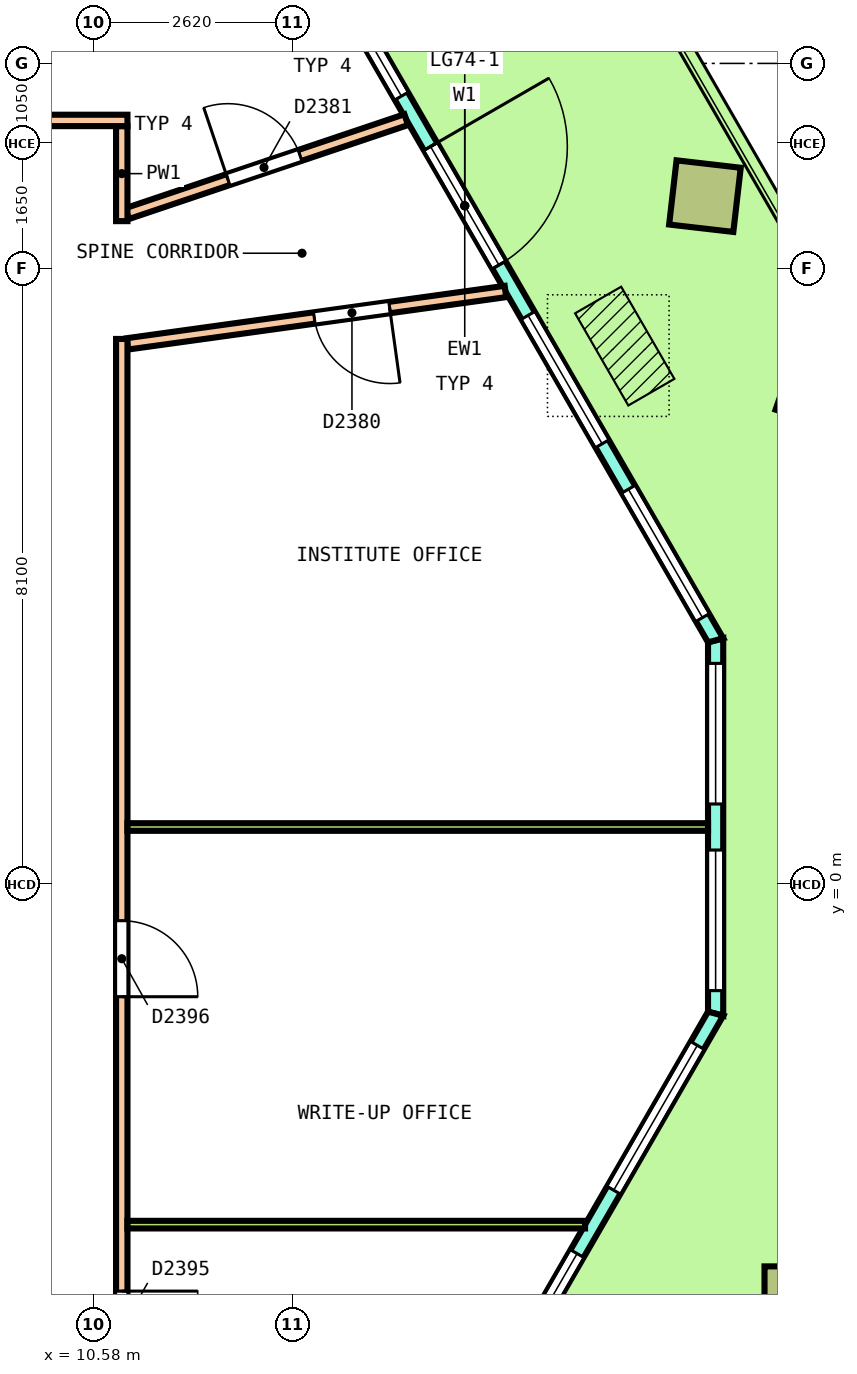
"""IFC4 building model, lengths in metres.
Left out: names, types, materials, properties, quantities, classifications, styles, units other than length and angle.
Written with IfcOpenShell. Run it as: python <this file> out.ifc"""

import sys

from ifc_helpers import new_model, si_unit, direction, frame, frame_2d, origin, origin_2d, place, context, subcontext, project, spatial, polyline, rectangle, outline, extrude, element, fill, save


model = new_model("IFC4")
c1 = context("Model", 3, precision=1e-05, world=origin(), true_north=direction((0.0, 1.0)))
c2 = subcontext(c1, "Body", "Model", "MODEL_VIEW")
j1 = project(units=[si_unit("LENGTHUNIT", "METRE"), si_unit("PLANEANGLEUNIT", "RADIAN")], contexts=[c1])
p1 = place(None, origin())
s1 = spatial("IfcSite", under=j1, at=p1, CompositionType="ELEMENT")
p2 = place(p1, origin())
s2 = spatial("IfcBuilding", under=s1, at=p2, CompositionType="ELEMENT")
p3 = place(p2, frame((0.0, 0.0, 332.6)))
s3 = spatial("IfcBuildingStorey", under=s2, at=p3, CompositionType="ELEMENT", Elevation=332.6)
p4 = place(p3, frame((20.093, 6.507, 0.0), z_axis=(0.021793949015, 0.025136579231, 0.999446434868), x_axis=(-0.499665408411, 0.866150057728, -0.010888394553)))
e1 = element("IfcColumn", 1, at=p4, inside=s3, PredefinedType="COLUMN", context=c2, shape_type="SweptSolid", body=[
    extrude(rectangle(XDim=0.85, YDim=0.85, at=origin_2d()), origin(), (0.0, 0.0, 1.0), 3.652),
])
p5 = place(p3, frame((18.622, 9.054, 0.0), z_axis=(0.025405336763, 0.018853434124, 0.999499433159), x_axis=(-0.500083894321, 0.865969380989, -0.003623510742)))
e2 = element("IfcColumn", 2, at=p5, inside=s3, PredefinedType="COLUMN", context=c2, shape_type="SweptSolid", body=[
    extrude(rectangle(XDim=0.85, YDim=0.85, at=origin_2d()), origin(), (0.0, 0.0, 1.0), 3.652),
])
p6 = place(p3, frame((19.831, -5.451, 0.0), z_axis=(0.010900423214, 0.018858400897, 0.999762742599), x_axis=(0.499728924135, 0.865907930491, -0.021782063614)))
e3 = element("IfcColumn", 3, at=p6, inside=s3, PredefinedType="COLUMN", context=c2, shape_type="SweptSolid", body=[
    extrude(rectangle(XDim=0.85, YDim=0.85, at=origin_2d()), origin(), (0.0, 0.0, 1.0), 3.651),
])
p7 = place(p3, frame((18.763, -1.702, 0.0), z_axis=(0.0, 0.0, 1.0), x_axis=(0.0, 1.0, 0.0)))
e4 = element("IfcWall", 4, at=p7, inside=s3, PredefinedType="SOLIDWALL", context=c2, shape_type="SweptSolid", body=[
    extrude(outline(polyline([(-0.027, -0.1), (1.214, -0.1), (2.456, -0.1), (3.697, -0.1), (4.938, -0.1), (4.885, 0.1), (3.67, 0.1), (2.456, 0.1), (1.241, 0.1), (0.027, 0.1), (-0.027, -0.1)])), origin(), (0.0, 0.0, 1.0), 3.7),
])
p8 = place(p7, frame((0.303, 0.0, 0.1)))
e5 = element("IfcOpeningElement", 5, at=p8, cuts=e4, PredefinedType="OPENING", context=c2, shape_type="SweptSolid", body=[
    extrude(rectangle(XDim=1.85, YDim=2.9, at=frame_2d((0.925, 1.45))), frame((0.0, 0.11, 0.0), z_axis=(0.0, -1.0, 0.0), x_axis=(1.0, 0.0, 0.0)), (0.0, 0.0, 1.0), 0.22),
])
p9 = place(p7, frame((2.759, 0.0, 0.1)))
e6 = element("IfcOpeningElement", 6, at=p9, cuts=e4, PredefinedType="OPENING", context=c2, shape_type="SweptSolid", body=[
    extrude(rectangle(XDim=1.85, YDim=2.9, at=frame_2d((0.925, 1.45))), frame((0.0, 0.11, 0.0), z_axis=(0.0, -1.0, 0.0), x_axis=(1.0, 0.0, 0.0)), (0.0, 0.0, 1.0), 0.22),
])
p10 = place(p3, frame((18.763, 3.21, 0.0), z_axis=(0.0, 0.0, 1.0), x_axis=(-0.499983359811, 0.866035010789, 0.0)))
e7 = element("IfcWall", 7, at=p10, inside=s3, PredefinedType="SOLIDWALL", context=c2, shape_type="SweptSolid", body=[
    extrude(outline(polyline([(-0.027, -0.1), (0.993, -0.1), (2.013, -0.1), (3.032, -0.1), (4.052, -0.1), (5.072, -0.1), (6.092, -0.1), (7.111, -0.1), (8.131, -0.1), (9.151, -0.1), (10.171, -0.1), (11.19, -0.1), (12.21, -0.1), (13.23, -0.1), (13.176, 0.1), (12.165, 0.1), (11.153, 0.1), (10.142, 0.1), (9.13, 0.1), (8.119, 0.1), (7.107, 0.1), (6.096, 0.1), (5.084, 0.1), (4.073, 0.1), (3.061, 0.1), (2.05, 0.1), (1.038, 0.1), (0.027, 0.1), (-0.027, -0.1)])), origin(), (0.0, 0.0, 1.0), 3.7),
])
p11 = place(p10, frame((0.345, 0.0, 0.1)))
e8 = element("IfcOpeningElement", 8, at=p11, cuts=e7, PredefinedType="OPENING", context=c2, shape_type="SweptSolid", body=[
    extrude(rectangle(XDim=1.95, YDim=2.9, at=frame_2d((0.975, 1.45))), frame((0.0, 0.11, 0.0), z_axis=(0.0, -1.0, 0.0), x_axis=(1.0, 0.0, 0.0)), (0.0, 0.0, 1.0), 0.22),
])
p12 = place(p10, frame((2.986, 0.0, 0.1)))
e9 = element("IfcOpeningElement", 9, at=p12, cuts=e7, PredefinedType="OPENING", context=c2, shape_type="SweptSolid", body=[
    extrude(rectangle(XDim=1.95, YDim=2.9, at=frame_2d((0.975, 1.45))), frame((0.0, 0.11, 0.0), z_axis=(0.0, -1.0, 0.0), x_axis=(1.0, 0.0, 0.0)), (0.0, 0.0, 1.0), 0.22),
])
p13 = place(p10, frame((5.701, 0.0, 0.0)))
e10 = element("IfcOpeningElement", 10, at=p13, cuts=e7, PredefinedType="OPENING", context=c2, shape_type="SweptSolid", body=[
    extrude(rectangle(XDim=1.8, YDim=2.4, at=frame_2d((0.9, 1.2))), frame((0.0, 0.11, 0.0), z_axis=(0.0, -1.0, 0.0), x_axis=(1.0, 0.0, 0.0)), (0.0, 0.0, 1.0), 0.22),
])
p14 = place(p10, frame((5.701, 0.0, 2.55)))
e11 = element("IfcOpeningElement", 11, at=p14, cuts=e7, PredefinedType="OPENING", context=c2, shape_type="SweptSolid", body=[
    extrude(rectangle(XDim=1.8, YDim=0.45, at=frame_2d((0.9, 0.225))), frame((0.0, 0.11, 0.0), z_axis=(0.0, -1.0, 0.0), x_axis=(1.0, 0.0, 0.0)), (0.0, 0.0, 1.0), 0.22),
])
p15 = place(p10, frame((8.267, 0.0, 0.1)))
e12 = element("IfcOpeningElement", 12, at=p15, cuts=e7, PredefinedType="OPENING", context=c2, shape_type="SweptSolid", body=[
    extrude(rectangle(XDim=1.95, YDim=2.9, at=frame_2d((0.975, 1.45))), frame((0.0, 0.11, 0.0), z_axis=(0.0, -1.0, 0.0), x_axis=(1.0, 0.0, 0.0)), (0.0, 0.0, 1.0), 0.22),
])
p16 = place(p10, frame((10.908, 0.0, 0.1)))
e13 = element("IfcOpeningElement", 13, at=p16, cuts=e7, PredefinedType="OPENING", context=c2, shape_type="SweptSolid", body=[
    extrude(rectangle(XDim=1.95, YDim=2.9, at=frame_2d((0.975, 1.45))), frame((0.0, 0.11, 0.0), z_axis=(0.0, -1.0, 0.0), x_axis=(1.0, 0.0, 0.0)), (0.0, 0.0, 1.0), 0.22),
])
p17 = place(p3, frame((10.855, -15.398, 0.0), z_axis=(0.0, 0.0, 1.0), x_axis=(0.500005733105, 0.86602209375, 0.0)))
e14 = element("IfcWall", 14, at=p17, inside=s3, PredefinedType="SOLIDWALL", context=c2, shape_type="SweptSolid", body=[
    extrude(outline(polyline([(-0.027, -0.1), (1.031, -0.1), (2.089, -0.1), (3.147, -0.1), (4.205, -0.1), (5.263, -0.1), (6.321, -0.1), (7.379, -0.1), (8.437, -0.1), (9.495, -0.1), (10.553, -0.1), (11.611, -0.1), (12.669, -0.1), (13.727, -0.1), (14.785, -0.1), (15.843, -0.1), (15.789, 0.1), (14.738, 0.1), (13.687, 0.1), (12.636, 0.1), (11.586, 0.1), (10.535, 0.1), (9.484, 0.1), (8.433, 0.1), (7.382, 0.1), (6.332, 0.1), (5.281, 0.1), (4.23, 0.1), (3.179, 0.1), (2.128, 0.1), (1.078, 0.1), (0.027, 0.1), (-0.027, -0.1)])), origin(), (0.0, 0.0, 1.0), 3.7),
])
p18 = place(p17, frame((0.482, 0.0, 0.1)))
e15 = element("IfcOpeningElement", 15, at=p18, cuts=e14, PredefinedType="OPENING", context=c2, shape_type="SweptSolid", body=[
    extrude(rectangle(XDim=2.2, YDim=2.9, at=frame_2d((1.1, 1.45))), frame((0.0, 0.11, 0.0), z_axis=(0.0, -1.0, 0.0), x_axis=(1.0, 0.0, 0.0)), (0.0, 0.0, 1.0), 0.22),
])
p19 = place(p17, frame((3.645, 0.0, 0.1)))
e16 = element("IfcOpeningElement", 16, at=p19, cuts=e14, PredefinedType="OPENING", context=c2, shape_type="SweptSolid", body=[
    extrude(rectangle(XDim=2.2, YDim=2.9, at=frame_2d((1.1, 1.45))), frame((0.0, 0.11, 0.0), z_axis=(0.0, -1.0, 0.0), x_axis=(1.0, 0.0, 0.0)), (0.0, 0.0, 1.0), 0.22),
])
p20 = place(p17, frame((7.008, 0.0, 0.0)))
e17 = element("IfcOpeningElement", 17, at=p20, cuts=e14, PredefinedType="OPENING", context=c2, shape_type="SweptSolid", body=[
    extrude(rectangle(XDim=1.8, YDim=2.4, at=frame_2d((0.9, 1.2))), frame((0.0, 0.11, 0.0), z_axis=(0.0, -1.0, 0.0), x_axis=(1.0, 0.0, 0.0)), (0.0, 0.0, 1.0), 0.22),
])
p21 = place(p17, frame((7.008, 0.0, 2.55)))
e18 = element("IfcOpeningElement", 18, at=p21, cuts=e14, PredefinedType="OPENING", context=c2, shape_type="SweptSolid", body=[
    extrude(rectangle(XDim=1.8, YDim=0.45, at=frame_2d((0.9, 0.225))), frame((0.0, 0.11, 0.0), z_axis=(0.0, -1.0, 0.0), x_axis=(1.0, 0.0, 0.0)), (0.0, 0.0, 1.0), 0.22),
])
p22 = place(p17, frame((9.971, 0.0, 0.1)))
e19 = element("IfcOpeningElement", 19, at=p22, cuts=e14, PredefinedType="OPENING", context=c2, shape_type="SweptSolid", body=[
    extrude(rectangle(XDim=2.2, YDim=2.9, at=frame_2d((1.1, 1.45))), frame((0.0, 0.11, 0.0), z_axis=(0.0, -1.0, 0.0), x_axis=(1.0, 0.0, 0.0)), (0.0, 0.0, 1.0), 0.22),
])
p23 = place(p17, frame((13.134, 0.0, 0.1)))
e20 = element("IfcOpeningElement", 20, at=p23, cuts=e14, PredefinedType="OPENING", context=c2, shape_type="SweptSolid", body=[
    extrude(rectangle(XDim=2.2, YDim=2.9, at=frame_2d((1.1, 1.45))), frame((0.0, 0.11, 0.0), z_axis=(0.0, -1.0, 0.0), x_axis=(1.0, 0.0, 0.0)), (0.0, 0.0, 1.0), 0.22),
])
p24 = place(p3, frame((11.024, 7.11, 0.0), z_axis=(0.0, 0.0, 1.0), x_axis=(0.990540616046, 0.137219852657, 0.0)))
e21 = element("IfcWall", 21, at=p24, inside=s3, PredefinedType="PARTITIONING", context=c2, shape_type="SweptSolid", body=[
    extrude(rectangle(XDim=5.021, YDim=0.15, at=frame_2d((2.51, 0.0))), origin(), (0.0, 0.0, 1.0), 3.05),
])
p25 = place(p24, frame((2.482, 0.0, 0.0)))
e22 = element("IfcOpeningElement", 22, at=p25, cuts=e21, PredefinedType="OPENING", context=c2, shape_type="SweptSolid", body=[
    extrude(rectangle(XDim=1.0, YDim=2.1, at=frame_2d((0.5, 1.05))), frame((0.0, 0.085, 0.0), z_axis=(0.0, -1.0, 0.0), x_axis=(1.0, 0.0, 0.0)), (0.0, 0.0, 1.0), 0.17),
])
p26 = place(p3, frame((11.021, 8.824, 0.0), z_axis=(0.0, 0.0, 1.0), x_axis=(0.94773378351, 0.319062181389, 0.0)))
e23 = element("IfcWall", 23, at=p26, inside=s3, PredefinedType="PARTITIONING", context=c2, shape_type="SweptSolid", body=[
    extrude(rectangle(XDim=3.874, YDim=0.15, at=frame_2d((1.937, 0.0))), origin(), (0.0, 0.0, 1.0), 3.05),
])
p27 = place(p26, frame((1.399, 0.0, 0.0)))
e24 = element("IfcOpeningElement", 24, at=p27, cuts=e23, PredefinedType="OPENING", context=c2, shape_type="SweptSolid", body=[
    extrude(rectangle(XDim=1.0, YDim=2.1, at=frame_2d((0.5, 1.05))), frame((0.0, 0.085, 0.0), z_axis=(0.0, -1.0, 0.0), x_axis=(1.0, 0.0, 0.0)), (0.0, 0.0, 1.0), 0.17),
])
p28 = place(p3, frame((10.95, -9.975, 0.0), z_axis=(0.0, 0.0, 1.0), x_axis=(0.0, 1.0, 0.0)))
e25 = element("IfcWall", 25, at=p28, inside=s3, PredefinedType="PARTITIONING", context=c2, shape_type="SweptSolid", body=[
    extrude(rectangle(XDim=17.15, YDim=0.15, at=frame_2d((8.575, 0.0))), origin(), (0.0, 0.0, 1.0), 3.05),
])
p29 = place(p28, frame((3.624, 0.0, 0.0)))
e26 = element("IfcOpeningElement", 26, at=p29, cuts=e25, PredefinedType="OPENING", context=c2, shape_type="SweptSolid", body=[
    extrude(rectangle(XDim=1.0, YDim=2.1, at=frame_2d((0.5, 1.05))), frame((0.0, 0.085, 0.0), z_axis=(0.0, -1.0, 0.0), x_axis=(1.0, 0.0, 0.0)), (0.0, 0.0, 1.0), 0.17),
])
p30 = place(p28, frame((8.496, 0.0, 0.0)))
e27 = element("IfcOpeningElement", 27, at=p30, cuts=e25, PredefinedType="OPENING", context=c2, shape_type="SweptSolid", body=[
    extrude(rectangle(XDim=1.0, YDim=2.1, at=frame_2d((0.5, 1.05))), frame((0.0, 0.085, 0.0), z_axis=(0.0, -1.0, 0.0), x_axis=(1.0, 0.0, 0.0)), (0.0, 0.0, 1.0), 0.17),
])
p31 = place(p3, frame((10.95, 8.725, 0.0), z_axis=(0.0, 0.0, 1.0), x_axis=(0.0, 1.0, 0.0)))
e28 = element("IfcWall", 28, at=p31, inside=s3, PredefinedType="PARTITIONING", context=c2, shape_type="SweptSolid", body=[
    extrude(rectangle(XDim=1.25, YDim=0.15, at=frame_2d((0.625, 0.0))), origin(), (0.0, 0.0, 1.0), 3.05),
])
p32 = place(p3, frame((-10.875, 10.05, 0.0), z_axis=(0.0, 0.0, 1.0), x_axis=(1.0, 0.0, 0.0)))
e29 = element("IfcWall", 29, at=p32, inside=s3, PredefinedType="PARTITIONING", context=c2, shape_type="SweptSolid", body=[
    extrude(rectangle(XDim=21.9, YDim=0.15, at=frame_2d((10.95, 0.0))), origin(), (0.0, 0.0, 1.0), 3.05),
])
p33 = place(p32, frame((16.354, 0.0, 0.0)))
e30 = element("IfcOpeningElement", 30, at=p33, cuts=e29, PredefinedType="OPENING", context=c2, shape_type="SweptSolid", body=[
    extrude(rectangle(XDim=1.0, YDim=2.1, at=frame_2d((0.5, 1.05))), frame((0.0, 0.085, 0.0), z_axis=(0.0, -1.0, 0.0), x_axis=(1.0, 0.0, 0.0)), (0.0, 0.0, 1.0), 0.17),
])
p34 = place(p32, frame((13.77, 0.0, 0.0)))
e31 = element("IfcOpeningElement", 31, at=p34, cuts=e29, PredefinedType="OPENING", context=c2, shape_type="SweptSolid", body=[
    extrude(rectangle(XDim=1.0, YDim=2.1, at=frame_2d((0.5, 1.05))), frame((0.0, 0.085, 0.0), z_axis=(0.0, -1.0, 0.0), x_axis=(1.0, 0.0, 0.0)), (0.0, 0.0, 1.0), 0.17),
])
p35 = place(p32, frame((10.375, 0.0, 0.0)))
e32 = element("IfcOpeningElement", 32, at=p35, cuts=e29, PredefinedType="OPENING", context=c2, shape_type="SweptSolid", body=[
    extrude(rectangle(XDim=1.0, YDim=2.1, at=frame_2d((0.5, 1.05))), frame((0.0, 0.085, 0.0), z_axis=(0.0, -1.0, 0.0), x_axis=(1.0, 0.0, 0.0)), (0.0, 0.0, 1.0), 0.17),
])
p36 = place(p32, frame((6.181, 0.0, 0.0)))
e33 = element("IfcOpeningElement", 33, at=p36, cuts=e29, PredefinedType="OPENING", context=c2, shape_type="SweptSolid", body=[
    extrude(rectangle(XDim=1.2, YDim=2.1, at=frame_2d((0.6, 1.05))), frame((0.0, 0.085, 0.0), z_axis=(0.0, -1.0, 0.0), x_axis=(1.0, 0.0, 0.0)), (0.0, 0.0, 1.0), 0.17),
])
p37 = place(p32, frame((1.365, 0.0, 0.0)))
e34 = element("IfcOpeningElement", 34, at=p37, cuts=e29, PredefinedType="OPENING", context=c2, shape_type="SweptSolid", body=[
    extrude(rectangle(XDim=1.0, YDim=2.1, at=frame_2d((0.5, 1.05))), frame((0.0, 0.085, 0.0), z_axis=(0.0, -1.0, 0.0), x_axis=(1.0, 0.0, 0.0)), (0.0, 0.0, 1.0), 0.17),
])
p38 = place(p3, frame((11.025, 0.754, 0.0), z_axis=(0.0, 0.0, 1.0), x_axis=(1.0, 0.0, 0.0)))
e35 = element("IfcWall", 35, at=p38, inside=s3, PredefinedType="PARTITIONING", context=c2, shape_type="SweptSolid", body=[
    extrude(rectangle(XDim=7.638, YDim=0.1, at=frame_2d((3.819, 0.0))), origin(), (0.0, 0.0, 1.0), 3.05),
])
p39 = place(p3, frame((11.025, -4.477, 0.0), z_axis=(0.0, 0.0, 1.0), x_axis=(1.0, 0.0, 0.0)))
e36 = element("IfcWall", 36, at=p39, inside=s3, PredefinedType="PARTITIONING", context=c2, shape_type="SweptSolid", body=[
    extrude(rectangle(XDim=6.02, YDim=0.1, at=frame_2d((3.01, 0.0))), origin(), (0.0, 0.0, 1.0), 3.05),
])
p40 = place(p8, origin())
e37 = element("IfcWindow", 37, at=p40, inside=s3, PartitioningType="SINGLE_PANEL", PredefinedType="WINDOW", context=c2, shape_type="SweptSolid", body=[
    extrude(rectangle(XDim=1.85, YDim=2.9, at=frame_2d((0.925, 1.45))), frame((0.0, 0.03, 0.0), z_axis=(0.0, -1.0, 0.0), x_axis=(1.0, 0.0, 0.0)), (0.0, 0.0, 1.0), 0.06),
])
fill(e5, e37)
p41 = place(p9, origin())
e38 = element("IfcWindow", 38, at=p41, inside=s3, PartitioningType="SINGLE_PANEL", PredefinedType="WINDOW", context=c2, shape_type="SweptSolid", body=[
    extrude(rectangle(XDim=1.85, YDim=2.9, at=frame_2d((0.925, 1.45))), frame((0.0, 0.03, 0.0), z_axis=(0.0, -1.0, 0.0), x_axis=(1.0, 0.0, 0.0)), (0.0, 0.0, 1.0), 0.06),
])
fill(e6, e38)
p42 = place(p11, origin())
e39 = element("IfcWindow", 39, at=p42, inside=s3, PartitioningType="SINGLE_PANEL", PredefinedType="WINDOW", context=c2, shape_type="SweptSolid", body=[
    extrude(rectangle(XDim=1.95, YDim=2.9, at=frame_2d((0.975, 1.45))), frame((0.0, 0.03, 0.0), z_axis=(0.0, -1.0, 0.0), x_axis=(1.0, 0.0, 0.0)), (0.0, 0.0, 1.0), 0.06),
])
fill(e8, e39)
p43 = place(p12, origin())
e40 = element("IfcWindow", 40, at=p43, inside=s3, PartitioningType="SINGLE_PANEL", PredefinedType="WINDOW", context=c2, shape_type="SweptSolid", body=[
    extrude(rectangle(XDim=1.95, YDim=2.9, at=frame_2d((0.975, 1.45))), frame((0.0, 0.03, 0.0), z_axis=(0.0, -1.0, 0.0), x_axis=(1.0, 0.0, 0.0)), (0.0, 0.0, 1.0), 0.06),
])
fill(e9, e40)
p44 = place(p13, origin())
e41 = element("IfcDoor", 41, at=p44, inside=s3, OperationType="DOUBLE_DOOR_SINGLE_SWING", PredefinedType="DOOR", context=c2, shape_type="SweptSolid", body=[
    extrude(rectangle(XDim=1.8, YDim=2.4, at=frame_2d((0.9, 1.2))), frame((0.0, 0.025, 0.0), z_axis=(0.0, -1.0, 0.0), x_axis=(1.0, 0.0, 0.0)), (0.0, 0.0, 1.0), 0.05),
])
fill(e10, e41)
p45 = place(p14, origin())
e42 = element("IfcWindow", 42, at=p45, inside=s3, PartitioningType="SINGLE_PANEL", PredefinedType="WINDOW", context=c2, shape_type="SweptSolid", body=[
    extrude(rectangle(XDim=1.8, YDim=0.45, at=frame_2d((0.9, 0.225))), frame((0.0, 0.03, 0.0), z_axis=(0.0, -1.0, 0.0), x_axis=(1.0, 0.0, 0.0)), (0.0, 0.0, 1.0), 0.06),
])
fill(e11, e42)
p46 = place(p15, origin())
e43 = element("IfcWindow", 43, at=p46, inside=s3, PartitioningType="SINGLE_PANEL", PredefinedType="WINDOW", context=c2, shape_type="SweptSolid", body=[
    extrude(rectangle(XDim=1.95, YDim=2.9, at=frame_2d((0.975, 1.45))), frame((0.0, 0.03, 0.0), z_axis=(0.0, -1.0, 0.0), x_axis=(1.0, 0.0, 0.0)), (0.0, 0.0, 1.0), 0.06),
])
fill(e12, e43)
p47 = place(p22, origin())
e44 = element("IfcWindow", 44, at=p47, inside=s3, PartitioningType="SINGLE_PANEL", PredefinedType="WINDOW", context=c2, shape_type="SweptSolid", body=[
    extrude(rectangle(XDim=2.2, YDim=2.9, at=frame_2d((1.1, 1.45))), frame((0.0, 0.03, 0.0), z_axis=(0.0, -1.0, 0.0), x_axis=(1.0, 0.0, 0.0)), (0.0, 0.0, 1.0), 0.06),
])
fill(e19, e44)
p48 = place(p23, origin())
e45 = element("IfcWindow", 45, at=p48, inside=s3, PartitioningType="SINGLE_PANEL", PredefinedType="WINDOW", context=c2, shape_type="SweptSolid", body=[
    extrude(rectangle(XDim=2.2, YDim=2.9, at=frame_2d((1.1, 1.45))), frame((0.0, 0.03, 0.0), z_axis=(0.0, -1.0, 0.0), x_axis=(1.0, 0.0, 0.0)), (0.0, 0.0, 1.0), 0.06),
])
fill(e20, e45)
p49 = place(p25, origin())
e46 = element("IfcDoor", 46, at=p49, inside=s3, OperationType="SINGLE_SWING_RIGHT", PredefinedType="DOOR", context=c2, shape_type="SweptSolid", body=[
    extrude(rectangle(XDim=1.0, YDim=2.1, at=frame_2d((0.5, 1.05))), frame((0.0, 0.025, 0.0), z_axis=(0.0, -1.0, 0.0), x_axis=(1.0, 0.0, 0.0)), (0.0, 0.0, 1.0), 0.05),
])
fill(e22, e46)
p50 = place(p27, origin())
e47 = element("IfcDoor", 47, at=p50, inside=s3, OperationType="SINGLE_SWING_LEFT", PredefinedType="DOOR", context=c2, shape_type="SweptSolid", body=[
    extrude(rectangle(XDim=1.0, YDim=2.1, at=frame_2d((0.5, 1.05))), frame((0.0, 0.025, 0.0), z_axis=(0.0, -1.0, 0.0), x_axis=(1.0, 0.0, 0.0)), (0.0, 0.0, 1.0), 0.05),
])
fill(e24, e47)
p51 = place(p29, origin())
e48 = element("IfcDoor", 48, at=p51, inside=s3, OperationType="SINGLE_SWING_RIGHT", PredefinedType="DOOR", context=c2, shape_type="SweptSolid", body=[
    extrude(rectangle(XDim=1.0, YDim=2.1, at=frame_2d((0.5, 1.05))), frame((0.0, 0.025, 0.0), z_axis=(0.0, -1.0, 0.0), x_axis=(1.0, 0.0, 0.0)), (0.0, 0.0, 1.0), 0.05),
])
fill(e26, e48)
p52 = place(p30, origin())
e49 = element("IfcDoor", 49, at=p52, inside=s3, OperationType="SINGLE_SWING_RIGHT", PredefinedType="DOOR", context=c2, shape_type="SweptSolid", body=[
    extrude(rectangle(XDim=1.0, YDim=2.1, at=frame_2d((0.5, 1.05))), frame((0.0, 0.025, 0.0), z_axis=(0.0, -1.0, 0.0), x_axis=(1.0, 0.0, 0.0)), (0.0, 0.0, 1.0), 0.05),
])
fill(e27, e49)
save(model, sys.argv[1])
